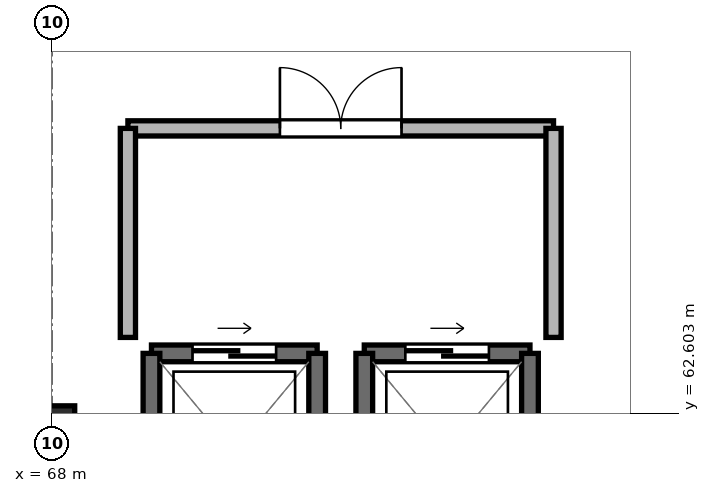
"""IFC4 building model, lengths in metres.
Left out: names, types, materials, properties, quantities, classifications, styles, units other than length and angle.
Written with IfcOpenShell. Run it as: python <this file> out.ifc"""

import sys

from ifc_helpers import new_model, si_unit, direction, frame, frame_2d, origin, origin_2d, place, context, subcontext, project, spatial, rectangle, extrude, element, fill, save


model = new_model("IFC4")
c1 = context("Model", 3, precision=1e-05, world=origin(), true_north=direction((0.0, 1.0)))
c2 = subcontext(c1, "Body", "Model", "MODEL_VIEW")
j1 = project(units=[si_unit("LENGTHUNIT", "METRE"), si_unit("PLANEANGLEUNIT", "RADIAN")], contexts=[c1])
p1 = place(None, origin())
s1 = spatial("IfcSite", under=j1, at=p1, CompositionType="ELEMENT")
p2 = place(p1, origin())
s2 = spatial("IfcBuilding", under=s1, at=p2, CompositionType="ELEMENT")
p3 = place(p2, frame((0.0, 0.0, 63.3)))
s3 = spatial("IfcBuildingStorey", under=s2, at=p3, CompositionType="ELEMENT", Elevation=63.3)
p4 = place(p3, frame((68.0, 62.4, -0.21), z_axis=(0.0, 0.0, 1.0), x_axis=(1.0, 0.0, 0.0)))
e1 = element("IfcColumn", 1, at=p4, inside=s3, PredefinedType="COLUMN", context=c2, shape_type="SweptSolid", body=[
    extrude(rectangle(XDim=0.6, YDim=0.6, at=origin_2d()), origin(), (0.0, 0.0, 1.0), 3.22),
])
p5 = place(p3, frame((71.49, 63.39, 0.0), z_axis=(0.0, 0.0, 1.0), x_axis=(-1.0, 0.0, 0.0)))
e2 = element("IfcWall", 2, at=p5, inside=s3, PredefinedType="SHEAR", context=c2, shape_type="SweptSolid", body=[
    extrude(rectangle(XDim=2.18, YDim=0.22, at=frame_2d((1.09, 0.0))), origin(), (0.0, 0.0, 1.0), 3.01),
])
p6 = place(p5, frame((0.54, 0.0, 0.0)))
e3 = element("IfcOpeningElement", 3, at=p6, cuts=e2, PredefinedType="OPENING", context=c2, shape_type="SweptSolid", body=[
    extrude(rectangle(XDim=1.1, YDim=2.2, at=frame_2d((0.55, 1.1))), frame((0.0, 0.122, 0.0), z_axis=(0.0, -1.0, 0.0), x_axis=(1.0, 0.0, 0.0)), (0.0, 0.0, 1.0), 0.244),
])
for number, where, z_axis, x_axis in (
    (4, (69.31, 63.39, 0.0), (0.0, 0.0, 1.0), (0.0, -1.0, 0.0)),
    (5, (71.49, 60.81, 0.0), (0.0, 0.0, 1.0), (0.0, 1.0, 0.0)),
):
    element("IfcWall", number, at=place(p3, frame(where, z_axis=z_axis, x_axis=x_axis)), inside=s3, PredefinedType="SHEAR", context=c2, shape_type="SweptSolid", body=[
        extrude(rectangle(XDim=2.58, YDim=0.22, at=frame_2d((1.29, 0.0))), origin(), (0.0, 0.0, 1.0), 3.01),
    ])
p7 = place(p3, frame((74.29, 63.39, 0.0), z_axis=(0.0, 0.0, 1.0), x_axis=(-1.0, 0.0, 0.0)))
e6 = element("IfcWall", 6, at=p7, inside=s3, PredefinedType="SHEAR", context=c2, shape_type="SweptSolid", body=[
    extrude(rectangle(XDim=2.18, YDim=0.22, at=frame_2d((1.09, 0.0))), origin(), (0.0, 0.0, 1.0), 3.01),
])
p8 = place(p7, frame((0.54, 0.0, 0.0)))
e7 = element("IfcOpeningElement", 7, at=p8, cuts=e6, PredefinedType="OPENING", context=c2, shape_type="SweptSolid", body=[
    extrude(rectangle(XDim=1.1, YDim=2.2, at=frame_2d((0.55, 1.1))), frame((0.0, 0.122, 0.0), z_axis=(0.0, -1.0, 0.0), x_axis=(1.0, 0.0, 0.0)), (0.0, 0.0, 1.0), 0.244),
])
for number, where, z_axis, x_axis in (
    (8, (72.11, 63.39, 0.0), (0.0, 0.0, 1.0), (0.0, -1.0, 0.0)),
    (9, (74.29, 60.81, 0.0), (0.0, 0.0, 1.0), (0.0, 1.0, 0.0)),
):
    element("IfcWall", number, at=place(p3, frame(where, z_axis=z_axis, x_axis=x_axis)), inside=s3, PredefinedType="SHEAR", context=c2, shape_type="SweptSolid", body=[
        extrude(rectangle(XDim=2.58, YDim=0.22, at=frame_2d((1.29, 0.0))), origin(), (0.0, 0.0, 1.0), 3.01),
    ])
p9 = place(p3, frame((69.0, 66.35, 0.0), z_axis=(0.0, 0.0, 1.0), x_axis=(1.0, 0.0, 0.0)))
e10 = element("IfcWall", 10, at=p9, inside=s3, PredefinedType="PARTITIONING", context=c2, shape_type="SweptSolid", body=[
    extrude(rectangle(XDim=5.6, YDim=0.2, at=frame_2d((2.8, 0.0))), origin(), (0.0, 0.0, 1.0), 2.53),
])
p10 = place(p9, frame((2.0, 0.0, 0.0)))
e11 = element("IfcOpeningElement", 11, at=p10, cuts=e10, PredefinedType="OPENING", context=c2, shape_type="SweptSolid", body=[
    extrude(rectangle(XDim=1.6, YDim=2.2, at=frame_2d((0.8, 1.1))), frame((0.0, 0.112, 0.0), z_axis=(0.0, -1.0, 0.0), x_axis=(1.0, 0.0, 0.0)), (0.0, 0.0, 1.0), 0.224),
])
for number, where, z_axis, x_axis in (
    (12, (69.0, 63.6, 0.0), (0.0, 0.0, 1.0), (0.0, 1.0, 0.0)),
    (13, (74.6, 63.6, 0.0), (0.0, 0.0, 1.0), (0.0, 1.0, 0.0)),
):
    element("IfcWall", number, at=place(p3, frame(where, z_axis=z_axis, x_axis=x_axis)), inside=s3, PredefinedType="PARTITIONING", context=c2, shape_type="SweptSolid", body=[
        extrude(rectangle(XDim=2.75, YDim=0.2, at=frame_2d((1.375, 0.0))), origin(), (0.0, 0.0, 1.0), 2.53),
    ])
p11 = place(p6, origin())
e14 = element("IfcDoor", 14, at=p11, inside=s3, OperationType="SLIDING_TO_LEFT", PredefinedType="DOOR", context=c2, shape_type="SweptSolid", body=[
    extrude(rectangle(XDim=1.1, YDim=2.2, at=frame_2d((0.55, 1.1))), frame((0.0, 0.025, 0.0), z_axis=(0.0, -1.0, 0.0), x_axis=(1.0, 0.0, 0.0)), (0.0, 0.0, 1.0), 0.05),
])
fill(e3, e14)
p12 = place(p8, origin())
e15 = element("IfcDoor", 15, at=p12, inside=s3, OperationType="SLIDING_TO_LEFT", PredefinedType="DOOR", context=c2, shape_type="SweptSolid", body=[
    extrude(rectangle(XDim=1.1, YDim=2.2, at=frame_2d((0.55, 1.1))), frame((0.0, 0.025, 0.0), z_axis=(0.0, -1.0, 0.0), x_axis=(1.0, 0.0, 0.0)), (0.0, 0.0, 1.0), 0.05),
])
fill(e7, e15)
p13 = place(p10, origin())
e16 = element("IfcDoor", 16, at=p13, inside=s3, OperationType="DOUBLE_DOOR_SINGLE_SWING", PredefinedType="DOOR", context=c2, shape_type="SweptSolid", body=[
    extrude(rectangle(XDim=1.6, YDim=2.2, at=frame_2d((0.8, 1.1))), frame((0.0, 0.025, 0.0), z_axis=(0.0, -1.0, 0.0), x_axis=(1.0, 0.0, 0.0)), (0.0, 0.0, 1.0), 0.05),
])
fill(e11, e16)
save(model, sys.argv[1])
